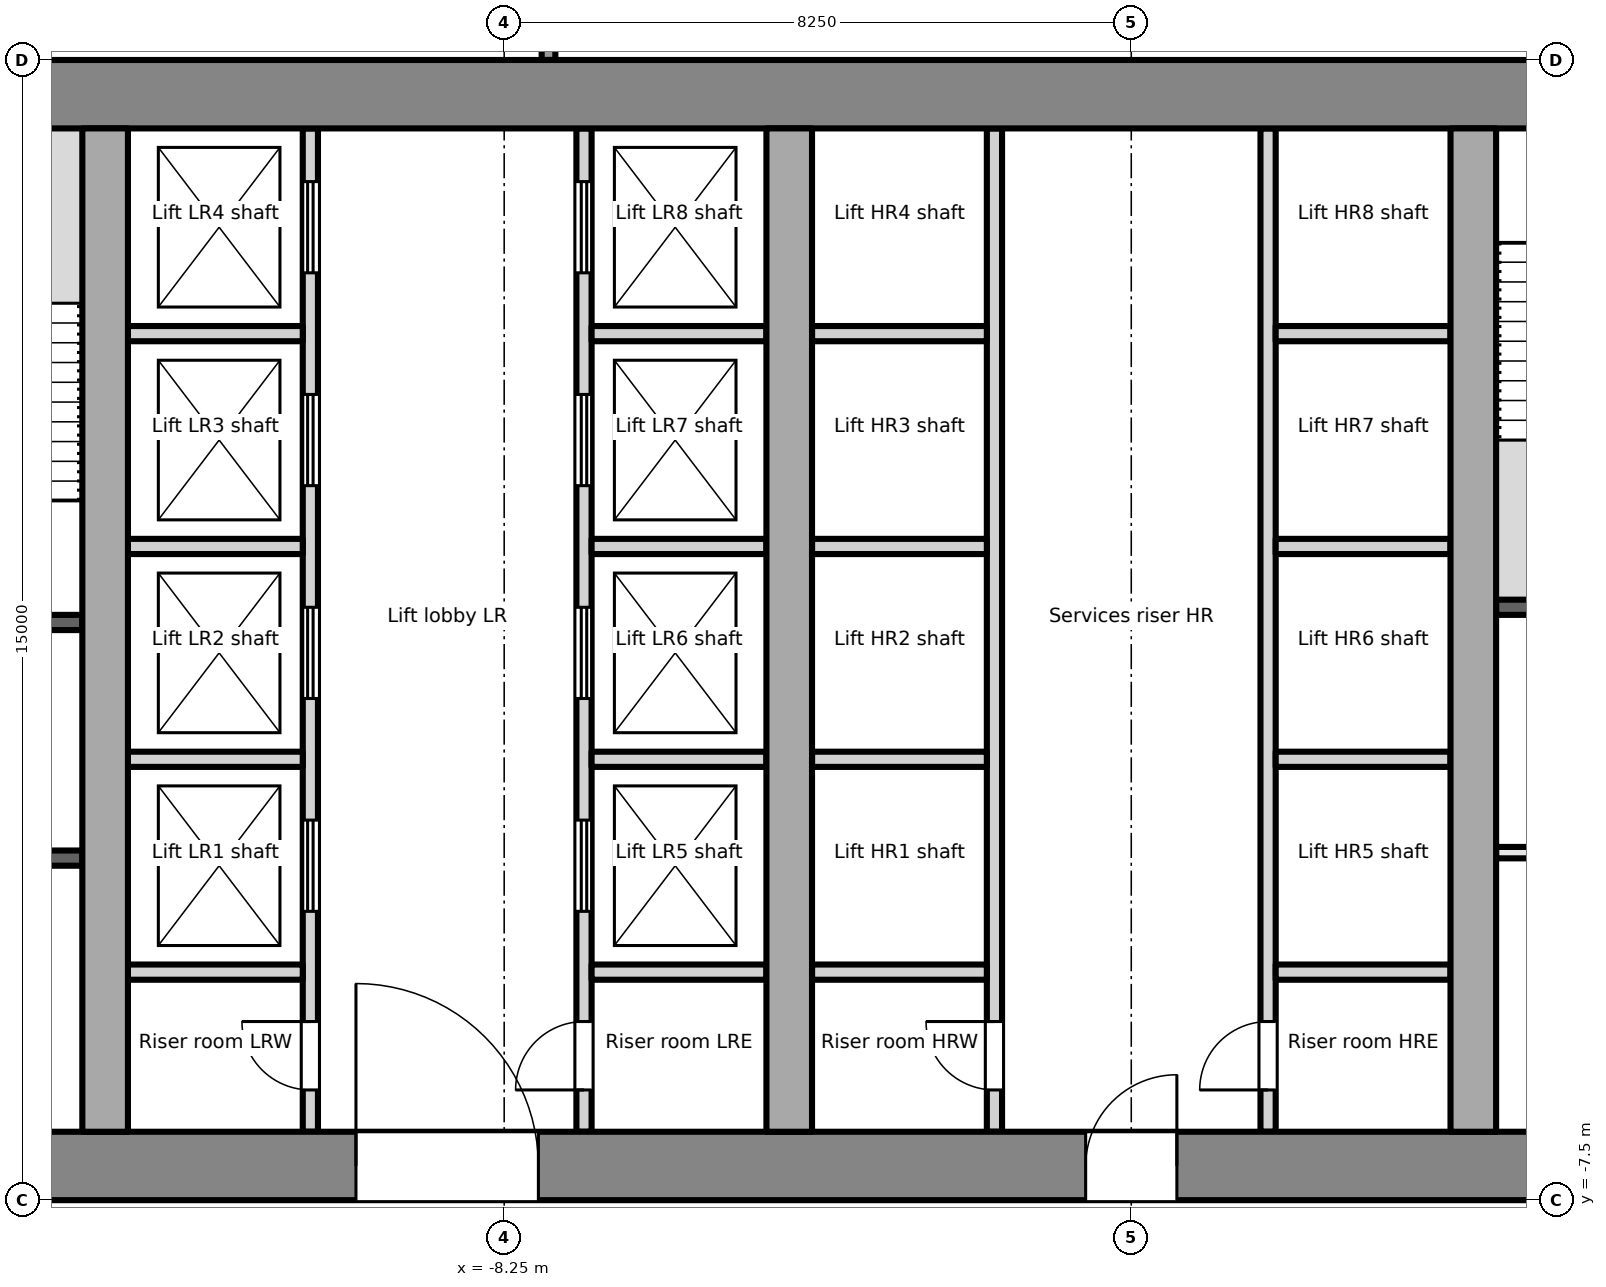
"""IFC4 building model, lengths in metres.
Left out: names, types, materials, properties, quantities, classifications, styles, units other than length and angle.
Written with IfcOpenShell. Run it as: python <this file> out.ifc"""

import sys

from ifc_helpers import new_model, si_unit, direction, frame, frame_2d, origin, place, context, subcontext, project, spatial, rectangle, extrude, element, fill, save


model = new_model("IFC4")
c1 = context("Model", 3, precision=1e-05, world=origin(), true_north=direction((0.0, 1.0)))
c2 = subcontext(c1, "Body", "Model", "MODEL_VIEW")
j1 = project(units=[si_unit("LENGTHUNIT", "METRE"), si_unit("PLANEANGLEUNIT", "RADIAN")], contexts=[c1])
p1 = place(None, origin())
s1 = spatial("IfcSite", under=j1, at=p1, CompositionType="ELEMENT")
p2 = place(p1, origin())
s2 = spatial("IfcBuilding", under=s1, at=p2, CompositionType="ELEMENT")
p3 = place(p2, frame((0.0, 0.0, 154.1)))
s3 = spatial("IfcBuildingStorey", under=s2, at=p3, CompositionType="ELEMENT", Elevation=154.1)
p4 = place(p3, frame((-18.0, -7.05, -0.2), z_axis=(0.0, 0.0, 1.0), x_axis=(1.0, 0.0, 0.0)))
e1 = element("IfcWall", 1, at=p4, inside=s3, PredefinedType="SHEAR", context=c2, shape_type="SweptSolid", body=[
    extrude(rectangle(XDim=36.0, YDim=0.9, at=frame_2d((18.0, 0.0))), origin(), (0.0, 0.0, 1.0), 4.0),
])
p5 = place(p4, frame((7.8, 0.0, 0.2)))
e2 = element("IfcOpeningElement", 2, at=p5, cuts=e1, PredefinedType="OPENING", context=c2, shape_type="SweptSolid", body=[
    extrude(rectangle(XDim=2.4, YDim=2.1, at=frame_2d((1.2, 1.05))), frame((0.0, 0.46, 0.0), z_axis=(0.0, -1.0, 0.0), x_axis=(1.0, 0.0, 0.0)), (0.0, 0.0, 1.0), 0.921),
])
p6 = place(p4, frame((17.4, 0.0, 0.2)))
e3 = element("IfcOpeningElement", 3, at=p6, cuts=e1, PredefinedType="OPENING", context=c2, shape_type="SweptSolid", body=[
    extrude(rectangle(XDim=1.2, YDim=2.1, at=frame_2d((0.6, 1.05))), frame((0.0, 0.46, 0.0), z_axis=(0.0, -1.0, 0.0), x_axis=(1.0, 0.0, 0.0)), (0.0, 0.0, 1.0), 0.921),
])
p7 = place(p4, frame((26.1, 0.0, 0.2)))
e4 = element("IfcOpeningElement", 4, at=p7, cuts=e1, PredefinedType="OPENING", context=c2, shape_type="SweptSolid", body=[
    extrude(rectangle(XDim=2.4, YDim=2.1, at=frame_2d((1.2, 1.05))), frame((0.0, 0.46, 0.0), z_axis=(0.0, -1.0, 0.0), x_axis=(1.0, 0.0, 0.0)), (0.0, 0.0, 1.0), 0.921),
])
p8 = place(p3, frame((-18.0, 7.05, -0.2), z_axis=(0.0, 0.0, 1.0), x_axis=(1.0, 0.0, 0.0)))
e5 = element("IfcWall", 5, at=p8, inside=s3, PredefinedType="SHEAR", context=c2, shape_type="SweptSolid", body=[
    extrude(rectangle(XDim=36.0, YDim=0.9, at=frame_2d((18.0, 0.0))), origin(), (0.0, 0.0, 1.0), 4.0),
])
for number, where, z_axis, x_axis in (
    (6, (-13.5, -6.6, -0.2), (0.0, 0.0, 1.0), (0.0, 1.0, 0.0)),
    (7, (-4.5, -6.6, -0.2), (0.0, 0.0, 1.0), (0.0, 1.0, 0.0)),
    (8, (4.5, -6.6, -0.2), (0.0, 0.0, 1.0), (0.0, 1.0, 0.0)),
):
    element("IfcWall", number, at=place(p3, frame(where, z_axis=z_axis, x_axis=x_axis)), inside=s3, PredefinedType="SHEAR", context=c2, shape_type="SweptSolid", body=[
        extrude(rectangle(XDim=13.2, YDim=0.6, at=frame_2d((6.6, 0.0))), origin(), (0.0, 0.0, 1.0), 4.0),
    ])
p9 = place(p3, frame((-17.1, -3.0, 0.0), z_axis=(0.0, 0.0, 1.0), x_axis=(1.0, 0.0, 0.0)))
e9 = element("IfcWall", 9, at=p9, inside=s3, PredefinedType="PARTITIONING", context=c2, shape_type="SweptSolid", body=[
    extrude(rectangle(XDim=3.3, YDim=0.2, at=frame_2d((1.65, 0.0))), origin(), (0.0, 0.0, 1.0), 3.8),
])
p10 = place(p9, frame((1.1, 0.0, 0.0)))
e10 = element("IfcOpeningElement", 10, at=p10, cuts=e9, PredefinedType="OPENING", context=c2, shape_type="SweptSolid", body=[
    extrude(rectangle(XDim=1.1, YDim=2.1, at=frame_2d((0.55, 1.05))), frame((0.0, 0.111, 0.0), z_axis=(0.0, -1.0, 0.0), x_axis=(1.0, 0.0, 0.0)), (0.0, 0.0, 1.0), 0.221),
])
p11 = place(p3, frame((-17.1, 0.1, 0.0), z_axis=(0.0, 0.0, 1.0), x_axis=(1.0, 0.0, 0.0)))
e11 = element("IfcWall", 11, at=p11, inside=s3, PredefinedType="PARTITIONING", context=c2, shape_type="SweptSolid", body=[
    extrude(rectangle(XDim=3.3, YDim=0.2, at=frame_2d((1.65, 0.0))), origin(), (0.0, 0.0, 1.0), 3.8),
])
p12 = place(p11, frame((1.1, 0.0, 0.0)))
e12 = element("IfcOpeningElement", 12, at=p12, cuts=e11, PredefinedType="OPENING", context=c2, shape_type="SweptSolid", body=[
    extrude(rectangle(XDim=1.1, YDim=2.1, at=frame_2d((0.55, 1.05))), frame((0.0, 0.111, 0.0), z_axis=(0.0, -1.0, 0.0), x_axis=(1.0, 0.0, 0.0)), (0.0, 0.0, 1.0), 0.221),
])
p13 = place(p3, frame((-10.8, -6.6, 0.0), z_axis=(0.0, 0.0, 1.0), x_axis=(0.0, 1.0, 0.0)))
e13 = element("IfcWall", 13, at=p13, inside=s3, PredefinedType="PARTITIONING", context=c2, shape_type="SweptSolid", body=[
    extrude(rectangle(XDim=13.2, YDim=0.2, at=frame_2d((6.6, 0.0))), origin(), (0.0, 0.0, 1.0), 3.8),
])
p14 = place(p13, frame((0.55, 0.0, 0.0)))
e14 = element("IfcOpeningElement", 14, at=p14, cuts=e13, PredefinedType="OPENING", context=c2, shape_type="SweptSolid", body=[
    extrude(rectangle(XDim=0.9, YDim=2.1, at=frame_2d((0.45, 1.05))), frame((0.0, 0.111, 0.0), z_axis=(0.0, -1.0, 0.0), x_axis=(1.0, 0.0, 0.0)), (0.0, 0.0, 1.0), 0.221),
])
p15 = place(p13, frame((2.9, 0.0, 0.0)))
e15 = element("IfcOpeningElement", 15, at=p15, cuts=e13, PredefinedType="OPENING", context=c2, shape_type="SweptSolid", body=[
    extrude(rectangle(XDim=1.2, YDim=2.1, at=frame_2d((0.6, 1.05))), frame((0.0, 0.111, 0.0), z_axis=(0.0, -1.0, 0.0), x_axis=(1.0, 0.0, 0.0)), (0.0, 0.0, 1.0), 0.221),
])
p16 = place(p13, frame((5.7, 0.0, 0.0)))
e16 = element("IfcOpeningElement", 16, at=p16, cuts=e13, PredefinedType="OPENING", context=c2, shape_type="SweptSolid", body=[
    extrude(rectangle(XDim=1.2, YDim=2.1, at=frame_2d((0.6, 1.05))), frame((0.0, 0.111, 0.0), z_axis=(0.0, -1.0, 0.0), x_axis=(1.0, 0.0, 0.0)), (0.0, 0.0, 1.0), 0.221),
])
p17 = place(p13, frame((8.5, 0.0, 0.0)))
e17 = element("IfcOpeningElement", 17, at=p17, cuts=e13, PredefinedType="OPENING", context=c2, shape_type="SweptSolid", body=[
    extrude(rectangle(XDim=1.2, YDim=2.1, at=frame_2d((0.6, 1.05))), frame((0.0, 0.111, 0.0), z_axis=(0.0, -1.0, 0.0), x_axis=(1.0, 0.0, 0.0)), (0.0, 0.0, 1.0), 0.221),
])
p18 = place(p13, frame((11.3, 0.0, 0.0)))
e18 = element("IfcOpeningElement", 18, at=p18, cuts=e13, PredefinedType="OPENING", context=c2, shape_type="SweptSolid", body=[
    extrude(rectangle(XDim=1.2, YDim=2.1, at=frame_2d((0.6, 1.05))), frame((0.0, 0.111, 0.0), z_axis=(0.0, -1.0, 0.0), x_axis=(1.0, 0.0, 0.0)), (0.0, 0.0, 1.0), 0.221),
])
p19 = place(p3, frame((-7.2, -6.6, 0.0), z_axis=(0.0, 0.0, 1.0), x_axis=(0.0, 1.0, 0.0)))
e19 = element("IfcWall", 19, at=p19, inside=s3, PredefinedType="PARTITIONING", context=c2, shape_type="SweptSolid", body=[
    extrude(rectangle(XDim=13.2, YDim=0.2, at=frame_2d((6.6, 0.0))), origin(), (0.0, 0.0, 1.0), 3.8),
])
p20 = place(p19, frame((0.55, 0.0, 0.0)))
e20 = element("IfcOpeningElement", 20, at=p20, cuts=e19, PredefinedType="OPENING", context=c2, shape_type="SweptSolid", body=[
    extrude(rectangle(XDim=0.9, YDim=2.1, at=frame_2d((0.45, 1.05))), frame((0.0, 0.111, 0.0), z_axis=(0.0, -1.0, 0.0), x_axis=(1.0, 0.0, 0.0)), (0.0, 0.0, 1.0), 0.221),
])
p21 = place(p19, frame((2.9, 0.0, 0.0)))
e21 = element("IfcOpeningElement", 21, at=p21, cuts=e19, PredefinedType="OPENING", context=c2, shape_type="SweptSolid", body=[
    extrude(rectangle(XDim=1.2, YDim=2.1, at=frame_2d((0.6, 1.05))), frame((0.0, 0.111, 0.0), z_axis=(0.0, -1.0, 0.0), x_axis=(1.0, 0.0, 0.0)), (0.0, 0.0, 1.0), 0.221),
])
p22 = place(p19, frame((5.7, 0.0, 0.0)))
e22 = element("IfcOpeningElement", 22, at=p22, cuts=e19, PredefinedType="OPENING", context=c2, shape_type="SweptSolid", body=[
    extrude(rectangle(XDim=1.2, YDim=2.1, at=frame_2d((0.6, 1.05))), frame((0.0, 0.111, 0.0), z_axis=(0.0, -1.0, 0.0), x_axis=(1.0, 0.0, 0.0)), (0.0, 0.0, 1.0), 0.221),
])
p23 = place(p19, frame((8.5, 0.0, 0.0)))
e23 = element("IfcOpeningElement", 23, at=p23, cuts=e19, PredefinedType="OPENING", context=c2, shape_type="SweptSolid", body=[
    extrude(rectangle(XDim=1.2, YDim=2.1, at=frame_2d((0.6, 1.05))), frame((0.0, 0.111, 0.0), z_axis=(0.0, -1.0, 0.0), x_axis=(1.0, 0.0, 0.0)), (0.0, 0.0, 1.0), 0.221),
])
p24 = place(p19, frame((11.3, 0.0, 0.0)))
e24 = element("IfcOpeningElement", 24, at=p24, cuts=e19, PredefinedType="OPENING", context=c2, shape_type="SweptSolid", body=[
    extrude(rectangle(XDim=1.2, YDim=2.1, at=frame_2d((0.6, 1.05))), frame((0.0, 0.111, 0.0), z_axis=(0.0, -1.0, 0.0), x_axis=(1.0, 0.0, 0.0)), (0.0, 0.0, 1.0), 0.221),
])
for number, where, z_axis, x_axis in (
    (25, (-13.2, -1.7, 0.0), (0.0, 0.0, 1.0), (1.0, 0.0, 0.0)),
    (26, (-13.2, 1.1, 0.0), (0.0, 0.0, 1.0), (1.0, 0.0, 0.0)),
    (27, (-13.2, 3.9, 0.0), (0.0, 0.0, 1.0), (1.0, 0.0, 0.0)),
    (28, (-13.2, -4.5, 0.0), (0.0, 0.0, 1.0), (1.0, 0.0, 0.0)),
    (29, (-7.1, -1.7, 0.0), (0.0, 0.0, 1.0), (1.0, 0.0, 0.0)),
    (30, (-7.1, 1.1, 0.0), (0.0, 0.0, 1.0), (1.0, 0.0, 0.0)),
    (31, (-7.1, 3.9, 0.0), (0.0, 0.0, 1.0), (1.0, 0.0, 0.0)),
    (32, (-7.1, -4.5, 0.0), (0.0, 0.0, 1.0), (1.0, 0.0, 0.0)),
):
    element("IfcWall", number, at=place(p3, frame(where, z_axis=z_axis, x_axis=x_axis)), inside=s3, PredefinedType="PARTITIONING", context=c2, shape_type="SweptSolid", body=[
        extrude(rectangle(XDim=2.3, YDim=0.2, at=frame_2d((1.15, 0.0))), origin(), (0.0, 0.0, 1.0), 3.8),
    ])
p25 = place(p3, frame((-1.8, -6.6, 0.0), z_axis=(0.0, 0.0, 1.0), x_axis=(0.0, 1.0, 0.0)))
e33 = element("IfcWall", 33, at=p25, inside=s3, PredefinedType="PARTITIONING", context=c2, shape_type="SweptSolid", body=[
    extrude(rectangle(XDim=13.2, YDim=0.2, at=frame_2d((6.6, 0.0))), origin(), (0.0, 0.0, 1.0), 3.8),
])
p26 = place(p25, frame((0.55, 0.0, 0.0)))
e34 = element("IfcOpeningElement", 34, at=p26, cuts=e33, PredefinedType="OPENING", context=c2, shape_type="SweptSolid", body=[
    extrude(rectangle(XDim=0.9, YDim=2.1, at=frame_2d((0.45, 1.05))), frame((0.0, 0.111, 0.0), z_axis=(0.0, -1.0, 0.0), x_axis=(1.0, 0.0, 0.0)), (0.0, 0.0, 1.0), 0.221),
])
p27 = place(p3, frame((1.8, -6.6, 0.0), z_axis=(0.0, 0.0, 1.0), x_axis=(0.0, 1.0, 0.0)))
e35 = element("IfcWall", 35, at=p27, inside=s3, PredefinedType="PARTITIONING", context=c2, shape_type="SweptSolid", body=[
    extrude(rectangle(XDim=13.2, YDim=0.2, at=frame_2d((6.6, 0.0))), origin(), (0.0, 0.0, 1.0), 3.8),
])
p28 = place(p27, frame((0.55, 0.0, 0.0)))
e36 = element("IfcOpeningElement", 36, at=p28, cuts=e35, PredefinedType="OPENING", context=c2, shape_type="SweptSolid", body=[
    extrude(rectangle(XDim=0.9, YDim=2.1, at=frame_2d((0.45, 1.05))), frame((0.0, 0.111, 0.0), z_axis=(0.0, -1.0, 0.0), x_axis=(1.0, 0.0, 0.0)), (0.0, 0.0, 1.0), 0.221),
])
for number, where, z_axis, x_axis in (
    (37, (-4.2, -1.7, 0.0), (0.0, 0.0, 1.0), (1.0, 0.0, 0.0)),
    (38, (-4.2, 1.1, 0.0), (0.0, 0.0, 1.0), (1.0, 0.0, 0.0)),
    (39, (-4.2, 3.9, 0.0), (0.0, 0.0, 1.0), (1.0, 0.0, 0.0)),
    (40, (-4.2, -4.5, 0.0), (0.0, 0.0, 1.0), (1.0, 0.0, 0.0)),
    (41, (1.9, -1.7, 0.0), (0.0, 0.0, 1.0), (1.0, 0.0, 0.0)),
    (42, (1.9, 1.1, 0.0), (0.0, 0.0, 1.0), (1.0, 0.0, 0.0)),
    (43, (1.9, 3.9, 0.0), (0.0, 0.0, 1.0), (1.0, 0.0, 0.0)),
    (44, (1.9, -4.5, 0.0), (0.0, 0.0, 1.0), (1.0, 0.0, 0.0)),
):
    element("IfcWall", number, at=place(p3, frame(where, z_axis=z_axis, x_axis=x_axis)), inside=s3, PredefinedType="PARTITIONING", context=c2, shape_type="SweptSolid", body=[
        extrude(rectangle(XDim=2.3, YDim=0.2, at=frame_2d((1.15, 0.0))), origin(), (0.0, 0.0, 1.0), 3.8),
    ])
p29 = place(p3, frame((4.8, 0.3, 0.0), z_axis=(0.0, 0.0, 1.0), x_axis=(1.0, 0.0, 0.0)))
e45 = element("IfcWall", 45, at=p29, inside=s3, PredefinedType="PARTITIONING", context=c2, shape_type="SweptSolid", body=[
    extrude(rectangle(XDim=3.15, YDim=0.2, at=frame_2d((1.575, 0.0))), origin(), (0.0, 0.0, 1.0), 3.8),
])
p30 = place(p3, frame((4.8, -2.928, 0.0), z_axis=(0.0, 0.0, 1.0), x_axis=(1.0, 0.0, 0.0)))
e46 = element("IfcWall", 46, at=p30, inside=s3, PredefinedType="PARTITIONING", context=c2, shape_type="SweptSolid", body=[
    extrude(rectangle(XDim=3.15, YDim=0.15, at=frame_2d((1.575, 0.0))), origin(), (0.0, 0.0, 1.0), 3.8),
])
p31 = place(p3, frame((-7.667, 12.24, 0.0), z_axis=(0.0, 0.0, 1.0), x_axis=(0.0, -1.0, 0.0)))
e47 = element("IfcWall", 47, at=p31, inside=s3, PredefinedType="PARTITIONING", context=c2, shape_type="SweptSolid", body=[
    extrude(rectangle(XDim=4.74, YDim=0.18, at=frame_2d((2.37, 0.0))), origin(), (0.0, 0.0, 1.0), 3.8),
])
p32 = place(p14, origin())
e48 = element("IfcDoor", 48, at=p32, inside=s3, OperationType="SINGLE_SWING_RIGHT", PredefinedType="DOOR", context=c2, shape_type="SweptSolid", body=[
    extrude(rectangle(XDim=0.9, YDim=2.1, at=frame_2d((0.45, 1.05))), frame((0.0, 0.025, 0.0), z_axis=(0.0, -1.0, 0.0), x_axis=(1.0, 0.0, 0.0)), (0.0, 0.0, 1.0), 0.05),
])
fill(e14, e48)
p33 = place(p15, origin())
e49 = element("IfcDoor", 49, at=p33, inside=s3, OperationType="DOUBLE_DOOR_SLIDING", PredefinedType="DOOR", context=c2, shape_type="SweptSolid", body=[
    extrude(rectangle(XDim=1.2, YDim=2.1, at=frame_2d((0.6, 1.05))), frame((0.0, 0.025, 0.0), z_axis=(0.0, -1.0, 0.0), x_axis=(1.0, 0.0, 0.0)), (0.0, 0.0, 1.0), 0.05),
])
fill(e15, e49)
p34 = place(p16, origin())
e50 = element("IfcDoor", 50, at=p34, inside=s3, OperationType="DOUBLE_DOOR_SLIDING", PredefinedType="DOOR", context=c2, shape_type="SweptSolid", body=[
    extrude(rectangle(XDim=1.2, YDim=2.1, at=frame_2d((0.6, 1.05))), frame((0.0, 0.025, 0.0), z_axis=(0.0, -1.0, 0.0), x_axis=(1.0, 0.0, 0.0)), (0.0, 0.0, 1.0), 0.05),
])
fill(e16, e50)
p35 = place(p17, origin())
e51 = element("IfcDoor", 51, at=p35, inside=s3, OperationType="DOUBLE_DOOR_SLIDING", PredefinedType="DOOR", context=c2, shape_type="SweptSolid", body=[
    extrude(rectangle(XDim=1.2, YDim=2.1, at=frame_2d((0.6, 1.05))), frame((0.0, 0.025, 0.0), z_axis=(0.0, -1.0, 0.0), x_axis=(1.0, 0.0, 0.0)), (0.0, 0.0, 1.0), 0.05),
])
fill(e17, e51)
p36 = place(p18, origin())
e52 = element("IfcDoor", 52, at=p36, inside=s3, OperationType="DOUBLE_DOOR_SLIDING", PredefinedType="DOOR", context=c2, shape_type="SweptSolid", body=[
    extrude(rectangle(XDim=1.2, YDim=2.1, at=frame_2d((0.6, 1.05))), frame((0.0, 0.025, 0.0), z_axis=(0.0, -1.0, 0.0), x_axis=(1.0, 0.0, 0.0)), (0.0, 0.0, 1.0), 0.05),
])
fill(e18, e52)
p37 = place(p20, origin())
e53 = element("IfcDoor", 53, at=p37, inside=s3, OperationType="SINGLE_SWING_LEFT", PredefinedType="DOOR", context=c2, shape_type="SweptSolid", body=[
    extrude(rectangle(XDim=0.9, YDim=2.1, at=frame_2d((0.45, 1.05))), frame((0.0, 0.025, 0.0), z_axis=(0.0, -1.0, 0.0), x_axis=(1.0, 0.0, 0.0)), (0.0, 0.0, 1.0), 0.05),
])
fill(e20, e53)
p38 = place(p21, origin())
e54 = element("IfcDoor", 54, at=p38, inside=s3, OperationType="DOUBLE_DOOR_SLIDING", PredefinedType="DOOR", context=c2, shape_type="SweptSolid", body=[
    extrude(rectangle(XDim=1.2, YDim=2.1, at=frame_2d((0.6, 1.05))), frame((0.0, 0.025, 0.0), z_axis=(0.0, -1.0, 0.0), x_axis=(1.0, 0.0, 0.0)), (0.0, 0.0, 1.0), 0.05),
])
fill(e21, e54)
p39 = place(p22, origin())
e55 = element("IfcDoor", 55, at=p39, inside=s3, OperationType="DOUBLE_DOOR_SLIDING", PredefinedType="DOOR", context=c2, shape_type="SweptSolid", body=[
    extrude(rectangle(XDim=1.2, YDim=2.1, at=frame_2d((0.6, 1.05))), frame((0.0, 0.025, 0.0), z_axis=(0.0, -1.0, 0.0), x_axis=(1.0, 0.0, 0.0)), (0.0, 0.0, 1.0), 0.05),
])
fill(e22, e55)
p40 = place(p23, origin())
e56 = element("IfcDoor", 56, at=p40, inside=s3, OperationType="DOUBLE_DOOR_SLIDING", PredefinedType="DOOR", context=c2, shape_type="SweptSolid", body=[
    extrude(rectangle(XDim=1.2, YDim=2.1, at=frame_2d((0.6, 1.05))), frame((0.0, 0.025, 0.0), z_axis=(0.0, -1.0, 0.0), x_axis=(1.0, 0.0, 0.0)), (0.0, 0.0, 1.0), 0.05),
])
fill(e23, e56)
p41 = place(p24, origin())
e57 = element("IfcDoor", 57, at=p41, inside=s3, OperationType="DOUBLE_DOOR_SLIDING", PredefinedType="DOOR", context=c2, shape_type="SweptSolid", body=[
    extrude(rectangle(XDim=1.2, YDim=2.1, at=frame_2d((0.6, 1.05))), frame((0.0, 0.025, 0.0), z_axis=(0.0, -1.0, 0.0), x_axis=(1.0, 0.0, 0.0)), (0.0, 0.0, 1.0), 0.05),
])
fill(e24, e57)
p42 = place(p5, origin())
e58 = element("IfcDoor", 58, at=p42, inside=s3, OperationType="DOUBLE_DOOR_DOUBLE_SWING", PredefinedType="DOOR", context=c2, shape_type="SweptSolid", body=[
    extrude(rectangle(XDim=2.4, YDim=2.1, at=frame_2d((1.2, 1.05))), frame((0.0, 0.025, 0.0), z_axis=(0.0, -1.0, 0.0), x_axis=(1.0, 0.0, 0.0)), (0.0, 0.0, 1.0), 0.05),
])
fill(e2, e58)
p43 = place(p26, origin())
e59 = element("IfcDoor", 59, at=p43, inside=s3, OperationType="SINGLE_SWING_RIGHT", PredefinedType="DOOR", context=c2, shape_type="SweptSolid", body=[
    extrude(rectangle(XDim=0.9, YDim=2.1, at=frame_2d((0.45, 1.05))), frame((0.0, 0.025, 0.0), z_axis=(0.0, -1.0, 0.0), x_axis=(1.0, 0.0, 0.0)), (0.0, 0.0, 1.0), 0.05),
])
fill(e34, e59)
p44 = place(p28, origin())
e60 = element("IfcDoor", 60, at=p44, inside=s3, OperationType="SINGLE_SWING_LEFT", PredefinedType="DOOR", context=c2, shape_type="SweptSolid", body=[
    extrude(rectangle(XDim=0.9, YDim=2.1, at=frame_2d((0.45, 1.05))), frame((0.0, 0.025, 0.0), z_axis=(0.0, -1.0, 0.0), x_axis=(1.0, 0.0, 0.0)), (0.0, 0.0, 1.0), 0.05),
])
fill(e36, e60)
p45 = place(p6, origin())
e61 = element("IfcDoor", 61, at=p45, inside=s3, OperationType="SINGLE_SWING_RIGHT", PredefinedType="DOOR", context=c2, shape_type="SweptSolid", body=[
    extrude(rectangle(XDim=1.2, YDim=2.1, at=frame_2d((0.6, 1.05))), frame((0.0, 0.025, 0.0), z_axis=(0.0, -1.0, 0.0), x_axis=(1.0, 0.0, 0.0)), (0.0, 0.0, 1.0), 0.05),
])
fill(e3, e61)
save(model, sys.argv[1])
